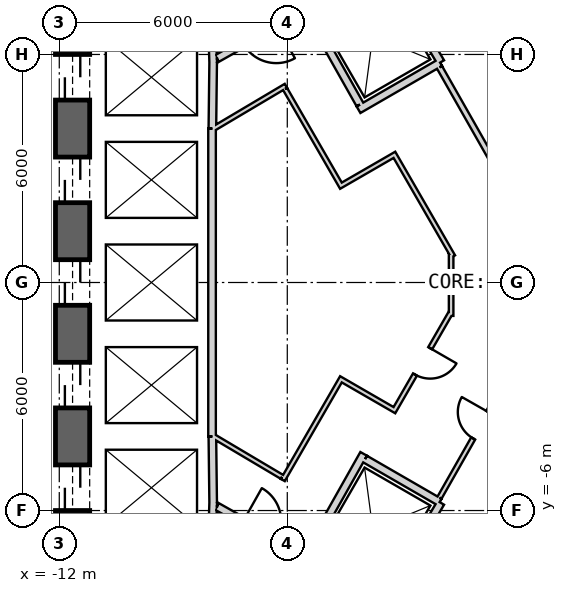
"""IFC4 building model, lengths in metres.
Left out: names, types, materials, properties, quantities, classifications, styles, units other than length and angle.
Written with IfcOpenShell. Run it as: python <this file> out.ifc"""

import sys

from ifc_helpers import new_model, si_unit, direction, frame, frame_2d, origin, place, context, subcontext, project, spatial, rectangle, extrude, element, fill, save


model = new_model("IFC4")
c1 = context("Model", 3, precision=1e-05, world=origin(), true_north=direction((0.0, 1.0)))
c2 = subcontext(c1, "Body", "Model", "MODEL_VIEW")
j1 = project(units=[si_unit("LENGTHUNIT", "METRE"), si_unit("PLANEANGLEUNIT", "RADIAN")], contexts=[c1])
p1 = place(None, origin())
s1 = spatial("IfcSite", under=j1, at=p1, CompositionType="ELEMENT")
p2 = place(p1, origin())
s2 = spatial("IfcBuilding", under=s1, at=p2, CompositionType="ELEMENT")
p3 = place(p2, frame((0.0, 0.0, 169.2)))
s3 = spatial("IfcBuildingStorey", under=s2, at=p3, CompositionType="ELEMENT", Elevation=169.2)
p4 = place(p3, frame((19.475, 2.208, 0.0), z_axis=(0.0, 0.0, 1.0), x_axis=(-0.866028369851, 0.499994862586, 0.0)))
e1 = element("IfcWall", 1, at=p4, inside=s3, PredefinedType="SHEAR", context=c2, shape_type="SweptSolid", body=[
    extrude(rectangle(XDim=31.523, YDim=0.9, at=frame_2d((15.762, 0.0))), origin(), (0.0, 0.0, 1.0), 4.0),
])
p5 = place(p4, frame((7.062, 0.0, 0.0)))
e2 = element("IfcOpeningElement", 2, at=p5, cuts=e1, PredefinedType="OPENING", context=c2, shape_type="SweptSolid", body=[
    extrude(rectangle(XDim=1.2, YDim=2.4, at=frame_2d((0.6, 1.2))), frame((0.0, 0.46, 0.0), z_axis=(0.0, -1.0, 0.0), x_axis=(1.0, 0.0, 0.0)), (0.0, 0.0, 1.0), 0.92),
])
p6 = place(p4, frame((3.612, 0.0, 0.0)))
e3 = element("IfcOpeningElement", 3, at=p6, cuts=e1, PredefinedType="OPENING", context=c2, shape_type="SweptSolid", body=[
    extrude(rectangle(XDim=1.2, YDim=2.4, at=frame_2d((0.6, 1.2))), frame((0.0, 0.46, 0.0), z_axis=(0.0, -1.0, 0.0), x_axis=(1.0, 0.0, 0.0)), (0.0, 0.0, 1.0), 0.92),
])
p7 = place(p4, frame((26.712, 0.0, 0.0)))
e4 = element("IfcOpeningElement", 4, at=p7, cuts=e1, PredefinedType="OPENING", context=c2, shape_type="SweptSolid", body=[
    extrude(rectangle(XDim=1.2, YDim=2.4, at=frame_2d((0.6, 1.2))), frame((0.0, 0.46, 0.0), z_axis=(0.0, -1.0, 0.0), x_axis=(1.0, 0.0, 0.0)), (0.0, 0.0, 1.0), 0.92),
])
p8 = place(p3, frame((-11.65, 15.762, 0.0), z_axis=(0.0, 0.0, 1.0), x_axis=(0.0, -1.0, 0.0)))
e5 = element("IfcWall", 5, at=p8, inside=s3, PredefinedType="SHEAR", context=c2, shape_type="SweptSolid", body=[
    extrude(rectangle(XDim=31.523, YDim=0.9, at=frame_2d((15.762, 0.0))), origin(), (0.0, 0.0, 1.0), 4.0),
])
p9 = place(p8, frame((7.062, 0.0, 0.0)))
e6 = element("IfcOpeningElement", 6, at=p9, cuts=e5, PredefinedType="OPENING", context=c2, shape_type="SweptSolid", body=[
    extrude(rectangle(XDim=1.2, YDim=2.4, at=frame_2d((0.6, 1.2))), frame((0.0, 0.46, 0.0), z_axis=(0.0, -1.0, 0.0), x_axis=(1.0, 0.0, 0.0)), (0.0, 0.0, 1.0), 0.92),
])
p10 = place(p8, frame((9.762, 0.0, 0.0)))
e7 = element("IfcOpeningElement", 7, at=p10, cuts=e5, PredefinedType="OPENING", context=c2, shape_type="SweptSolid", body=[
    extrude(rectangle(XDim=1.2, YDim=2.4, at=frame_2d((0.6, 1.2))), frame((0.0, 0.46, 0.0), z_axis=(0.0, -1.0, 0.0), x_axis=(1.0, 0.0, 0.0)), (0.0, 0.0, 1.0), 0.92),
])
p11 = place(p8, frame((12.462, 0.0, 0.0)))
e8 = element("IfcOpeningElement", 8, at=p11, cuts=e5, PredefinedType="OPENING", context=c2, shape_type="SweptSolid", body=[
    extrude(rectangle(XDim=1.2, YDim=2.4, at=frame_2d((0.6, 1.2))), frame((0.0, 0.46, 0.0), z_axis=(0.0, -1.0, 0.0), x_axis=(1.0, 0.0, 0.0)), (0.0, 0.0, 1.0), 0.92),
])
p12 = place(p8, frame((15.162, 0.0, 0.0)))
e9 = element("IfcOpeningElement", 9, at=p12, cuts=e5, PredefinedType="OPENING", context=c2, shape_type="SweptSolid", body=[
    extrude(rectangle(XDim=1.2, YDim=2.4, at=frame_2d((0.6, 1.2))), frame((0.0, 0.46, 0.0), z_axis=(0.0, -1.0, 0.0), x_axis=(1.0, 0.0, 0.0)), (0.0, 0.0, 1.0), 0.92),
])
p13 = place(p8, frame((17.862, 0.0, 0.0)))
e10 = element("IfcOpeningElement", 10, at=p13, cuts=e5, PredefinedType="OPENING", context=c2, shape_type="SweptSolid", body=[
    extrude(rectangle(XDim=1.2, YDim=2.4, at=frame_2d((0.6, 1.2))), frame((0.0, 0.46, 0.0), z_axis=(0.0, -1.0, 0.0), x_axis=(1.0, 0.0, 0.0)), (0.0, 0.0, 1.0), 0.92),
])
p14 = place(p8, frame((20.562, 0.0, 0.0)))
e11 = element("IfcOpeningElement", 11, at=p14, cuts=e5, PredefinedType="OPENING", context=c2, shape_type="SweptSolid", body=[
    extrude(rectangle(XDim=1.2, YDim=2.4, at=frame_2d((0.6, 1.2))), frame((0.0, 0.46, 0.0), z_axis=(0.0, -1.0, 0.0), x_axis=(1.0, 0.0, 0.0)), (0.0, 0.0, 1.0), 0.92),
])
p15 = place(p8, frame((23.262, 0.0, 0.0)))
e12 = element("IfcOpeningElement", 12, at=p15, cuts=e5, PredefinedType="OPENING", context=c2, shape_type="SweptSolid", body=[
    extrude(rectangle(XDim=1.2, YDim=2.4, at=frame_2d((0.6, 1.2))), frame((0.0, 0.46, 0.0), z_axis=(0.0, -1.0, 0.0), x_axis=(1.0, 0.0, 0.0)), (0.0, 0.0, 1.0), 0.92),
])
p16 = place(p8, frame((3.612, 0.0, 0.0)))
e13 = element("IfcOpeningElement", 13, at=p16, cuts=e5, PredefinedType="OPENING", context=c2, shape_type="SweptSolid", body=[
    extrude(rectangle(XDim=1.2, YDim=2.4, at=frame_2d((0.6, 1.2))), frame((0.0, 0.46, 0.0), z_axis=(0.0, -1.0, 0.0), x_axis=(1.0, 0.0, 0.0)), (0.0, 0.0, 1.0), 0.92),
])
p17 = place(p8, frame((26.712, 0.0, 0.0)))
e14 = element("IfcOpeningElement", 14, at=p17, cuts=e5, PredefinedType="OPENING", context=c2, shape_type="SweptSolid", body=[
    extrude(rectangle(XDim=1.2, YDim=2.4, at=frame_2d((0.6, 1.2))), frame((0.0, 0.46, 0.0), z_axis=(0.0, -1.0, 0.0), x_axis=(1.0, 0.0, 0.0)), (0.0, 0.0, 1.0), 0.92),
])
p18 = place(p3, frame((-7.825, -17.97, 0.0), z_axis=(0.0, 0.0, 1.0), x_axis=(0.866028369851, 0.499994862586, 0.0)))
e15 = element("IfcWall", 15, at=p18, inside=s3, PredefinedType="SHEAR", context=c2, shape_type="SweptSolid", body=[
    extrude(rectangle(XDim=31.523, YDim=0.9, at=frame_2d((15.762, 0.0))), origin(), (0.0, 0.0, 1.0), 4.0),
])
p19 = place(p18, frame((7.062, 0.0, 0.0)))
e16 = element("IfcOpeningElement", 16, at=p19, cuts=e15, PredefinedType="OPENING", context=c2, shape_type="SweptSolid", body=[
    extrude(rectangle(XDim=1.2, YDim=2.4, at=frame_2d((0.6, 1.2))), frame((0.0, 0.46, 0.0), z_axis=(0.0, -1.0, 0.0), x_axis=(1.0, 0.0, 0.0)), (0.0, 0.0, 1.0), 0.92),
])
p20 = place(p18, frame((9.762, 0.0, 0.0)))
e17 = element("IfcOpeningElement", 17, at=p20, cuts=e15, PredefinedType="OPENING", context=c2, shape_type="SweptSolid", body=[
    extrude(rectangle(XDim=1.2, YDim=2.4, at=frame_2d((0.6, 1.2))), frame((0.0, 0.46, 0.0), z_axis=(0.0, -1.0, 0.0), x_axis=(1.0, 0.0, 0.0)), (0.0, 0.0, 1.0), 0.92),
])
p21 = place(p18, frame((12.462, 0.0, 0.0)))
e18 = element("IfcOpeningElement", 18, at=p21, cuts=e15, PredefinedType="OPENING", context=c2, shape_type="SweptSolid", body=[
    extrude(rectangle(XDim=1.2, YDim=2.4, at=frame_2d((0.6, 1.2))), frame((0.0, 0.46, 0.0), z_axis=(0.0, -1.0, 0.0), x_axis=(1.0, 0.0, 0.0)), (0.0, 0.0, 1.0), 0.92),
])
p22 = place(p18, frame((15.162, 0.0, 0.0)))
e19 = element("IfcOpeningElement", 19, at=p22, cuts=e15, PredefinedType="OPENING", context=c2, shape_type="SweptSolid", body=[
    extrude(rectangle(XDim=1.2, YDim=2.4, at=frame_2d((0.6, 1.2))), frame((0.0, 0.46, 0.0), z_axis=(0.0, -1.0, 0.0), x_axis=(1.0, 0.0, 0.0)), (0.0, 0.0, 1.0), 0.92),
])
p23 = place(p18, frame((17.862, 0.0, 0.0)))
e20 = element("IfcOpeningElement", 20, at=p23, cuts=e15, PredefinedType="OPENING", context=c2, shape_type="SweptSolid", body=[
    extrude(rectangle(XDim=1.2, YDim=2.4, at=frame_2d((0.6, 1.2))), frame((0.0, 0.46, 0.0), z_axis=(0.0, -1.0, 0.0), x_axis=(1.0, 0.0, 0.0)), (0.0, 0.0, 1.0), 0.92),
])
p24 = place(p18, frame((20.562, 0.0, 0.0)))
e21 = element("IfcOpeningElement", 21, at=p24, cuts=e15, PredefinedType="OPENING", context=c2, shape_type="SweptSolid", body=[
    extrude(rectangle(XDim=1.2, YDim=2.4, at=frame_2d((0.6, 1.2))), frame((0.0, 0.46, 0.0), z_axis=(0.0, -1.0, 0.0), x_axis=(1.0, 0.0, 0.0)), (0.0, 0.0, 1.0), 0.92),
])
p25 = place(p18, frame((26.712, 0.0, 0.0)))
e22 = element("IfcOpeningElement", 22, at=p25, cuts=e15, PredefinedType="OPENING", context=c2, shape_type="SweptSolid", body=[
    extrude(rectangle(XDim=1.2, YDim=2.4, at=frame_2d((0.6, 1.2))), frame((0.0, 0.46, 0.0), z_axis=(0.0, -1.0, 0.0), x_axis=(1.0, 0.0, 0.0)), (0.0, 0.0, 1.0), 0.92),
])
p26 = place(p18, frame((3.612, 0.0, 0.0)))
e23 = element("IfcOpeningElement", 23, at=p26, cuts=e15, PredefinedType="OPENING", context=c2, shape_type="SweptSolid", body=[
    extrude(rectangle(XDim=1.2, YDim=2.4, at=frame_2d((0.6, 1.2))), frame((0.0, 0.46, 0.0), z_axis=(0.0, -1.0, 0.0), x_axis=(1.0, 0.0, 0.0)), (0.0, 0.0, 1.0), 0.92),
])
p27 = place(p3, frame((-7.977, 6.65, 0.0), z_axis=(0.0, 0.0, 1.0), x_axis=(0.030861509705, -0.999523670164, 0.0)))
e24 = element("IfcWall", 24, at=p27, inside=s3, PredefinedType="PLUMBINGWALL", context=c2, shape_type="SweptSolid", body=[
    extrude(rectangle(XDim=0.878, YDim=0.2, at=frame_2d((0.439, 0.0))), origin(), (0.0, 0.0, 1.0), 3.7),
])
p28 = place(p3, frame((-7.949, 5.895, 0.0), z_axis=(0.0, 0.0, 1.0), x_axis=(-0.012042535896, -0.999927486035, 0.0)))
e25 = element("IfcWall", 25, at=p28, inside=s3, PredefinedType="PLUMBINGWALL", context=c2, shape_type="SweptSolid", body=[
    extrude(rectangle(XDim=1.845, YDim=0.2, at=frame_2d((0.922, 0.0))), origin(), (0.0, 0.0, 1.0), 3.7),
])
p29 = place(p3, frame((-7.98, 4.05, 0.0), z_axis=(0.0, 0.0, 1.0), x_axis=(0.0, -1.0, 0.0)))
e26 = element("IfcWall", 26, at=p29, inside=s3, PredefinedType="PLUMBINGWALL", context=c2, shape_type="SweptSolid", body=[
    extrude(rectangle(XDim=8.1, YDim=0.2, at=frame_2d((4.05, 0.0))), origin(), (0.0, 0.0, 1.0), 3.7),
])
p30 = place(p3, frame((-7.95, -5.772, 0.0), z_axis=(0.0, 0.0, 1.0), x_axis=(-0.030803413295, -0.999525462272, 0.0)))
e27 = element("IfcWall", 27, at=p30, inside=s3, PredefinedType="PLUMBINGWALL", context=c2, shape_type="SweptSolid", body=[
    extrude(rectangle(XDim=1.078, YDim=0.2, at=frame_2d((0.539, 0.0))), origin(), (0.0, 0.0, 1.0), 3.7),
])
p31 = place(p3, frame((-7.971, -4.05, 0.0), z_axis=(0.0, 0.0, 1.0), x_axis=(0.012042535896, -0.999927486035, 0.0)))
e28 = element("IfcWall", 28, at=p31, inside=s3, PredefinedType="PLUMBINGWALL", context=c2, shape_type="SweptSolid", body=[
    extrude(rectangle(XDim=1.845, YDim=0.2, at=frame_2d((0.922, 0.0))), origin(), (0.0, 0.0, 1.0), 3.7),
])
p32 = place(p3, frame((-3.538, 8.465, 0.0), z_axis=(0.0, 0.0, 1.0), x_axis=(0.508647062354, -0.860975125052, 0.0)))
e29 = element("IfcWall", 29, at=p32, inside=s3, PredefinedType="PLUMBINGWALL", context=c2, shape_type="SweptSolid", body=[
    extrude(rectangle(XDim=3.1, YDim=0.2, at=frame_2d((1.55, 0.0))), origin(), (0.0, 0.0, 1.0), 3.7),
])
p33 = place(p3, frame((-1.979, 5.786, 0.0), z_axis=(0.0, 0.0, 1.0), x_axis=(-0.866016689309, -0.500015093611, 0.0)))
e30 = element("IfcWall", 30, at=p33, inside=s3, PredefinedType="PLUMBINGWALL", context=c2, shape_type="SweptSolid", body=[
    extrude(rectangle(XDim=2.479, YDim=0.2, at=frame_2d((1.24, 0.0))), origin(), (0.0, 0.0, 1.0), 3.7),
])
p34 = place(p3, frame((-5.562, 7.296, 0.0), z_axis=(0.0, 0.0, 1.0), x_axis=(0.49134651263, -0.870964180966, 0.0)))
e31 = element("IfcWall", 31, at=p34, inside=s3, PredefinedType="PLUMBINGWALL", context=c2, shape_type="SweptSolid", body=[
    extrude(rectangle(XDim=3.0, YDim=0.2, at=frame_2d((1.5, 0.0))), origin(), (0.0, 0.0, 1.0), 3.7),
])
p35 = place(p3, frame((-1.961, -5.796, 0.0), z_axis=(0.0, 0.0, 1.0), x_axis=(-0.508647062354, -0.860975125052, 0.0)))
e32 = element("IfcWall", 32, at=p35, inside=s3, PredefinedType="PLUMBINGWALL", context=c2, shape_type="SweptSolid", body=[
    extrude(rectangle(XDim=3.1, YDim=0.2, at=frame_2d((1.55, 0.0))), origin(), (0.0, 0.0, 1.0), 3.7),
])
p36 = place(p3, frame((-3.99, -4.509, 0.0), z_axis=(0.0, 0.0, 1.0), x_axis=(-0.491358283181, -0.870957540612, 0.0)))
e33 = element("IfcWall", 33, at=p36, inside=s3, PredefinedType="PLUMBINGWALL", context=c2, shape_type="SweptSolid", body=[
    extrude(rectangle(XDim=3.2, YDim=0.2, at=frame_2d((1.6, 0.0))), origin(), (0.0, 0.0, 1.0), 3.7),
])
p37 = place(p3, frame((-3.953, -4.646, 0.0), z_axis=(0.0, 0.0, 1.0), x_axis=(0.866065302921, -0.4999308863, 0.0)))
e34 = element("IfcWall", 34, at=p37, inside=s3, PredefinedType="PLUMBINGWALL", context=c2, shape_type="SweptSolid", body=[
    extrude(rectangle(XDim=2.264, YDim=0.2, at=frame_2d((1.132, 0.0))), origin(), (0.0, 0.0, 1.0), 3.7),
])
p38 = place(p3, frame((-5.6, 7.16, 0.0), z_axis=(0.0, 0.0, 1.0), x_axis=(-0.871363259478, -0.490638431059, 0.0)))
e35 = element("IfcWall", 35, at=p38, inside=s3, PredefinedType="PARTITIONING", context=c2, shape_type="SweptSolid", body=[
    extrude(rectangle(XDim=2.581, YDim=0.2, at=frame_2d((1.291, 0.0))), origin(), (0.0, 0.0, 1.0), 3.7),
])
p39 = place(p38, frame((0.791, 0.0, 0.0)))
e36 = element("IfcOpeningElement", 36, at=p39, cuts=e35, PredefinedType="OPENING", context=c2, shape_type="SweptSolid", body=[
    extrude(rectangle(XDim=1.0, YDim=2.1, at=frame_2d((0.5, 1.05))), frame((0.0, 0.11, 0.0), z_axis=(0.0, -1.0, 0.0), x_axis=(1.0, 0.0, 0.0)), (0.0, 0.0, 1.0), 0.22),
])
p40 = place(p3, frame((-7.849, -5.894, 0.0), z_axis=(0.0, 0.0, 1.0), x_axis=(0.871363259478, -0.490638431059, 0.0)))
e37 = element("IfcWall", 37, at=p40, inside=s3, PredefinedType="PARTITIONING", context=c2, shape_type="SweptSolid", body=[
    extrude(rectangle(XDim=2.581, YDim=0.2, at=frame_2d((1.291, 0.0))), origin(), (0.0, 0.0, 1.0), 3.7),
])
p41 = place(p40, frame((0.791, 0.0, 0.0)))
e38 = element("IfcOpeningElement", 38, at=p41, cuts=e37, PredefinedType="OPENING", context=c2, shape_type="SweptSolid", body=[
    extrude(rectangle(XDim=1.0, YDim=2.1, at=frame_2d((0.5, 1.05))), frame((0.0, 0.11, 0.0), z_axis=(0.0, -1.0, 0.0), x_axis=(1.0, 0.0, 0.0)), (0.0, 0.0, 1.0), 0.22),
])
p42 = place(p3, frame((-1.994, 5.661, 0.0), z_axis=(0.0, 0.0, 1.0), x_axis=(0.494341211302, -0.869267948798, 0.0)))
e39 = element("IfcWall", 39, at=p42, inside=s3, PredefinedType="PLUMBINGWALL", context=c2, shape_type="SweptSolid", body=[
    extrude(rectangle(XDim=4.361, YDim=0.15, at=frame_2d((2.18, 0.0))), origin(), (0.0, 0.0, 1.0), 3.7),
])
p43 = place(p3, frame((0.224, -1.761, 0.0), z_axis=(0.0, 0.0, 1.0), x_axis=(-0.494327216836, -0.869275907118, 0.0)))
e40 = element("IfcWall", 40, at=p43, inside=s3, PredefinedType="PARTITIONING", context=c2, shape_type="SweptSolid", body=[
    extrude(rectangle(XDim=4.487, YDim=0.12, at=frame_2d((2.244, 0.0))), origin(), (0.0, 0.0, 1.0), 3.7),
])
p44 = place(p43, frame((1.895, 0.0, 0.0)))
e41 = element("IfcOpeningElement", 41, at=p44, cuts=e40, PredefinedType="OPENING", context=c2, shape_type="SweptSolid", body=[
    extrude(rectangle(XDim=0.8, YDim=2.1, at=frame_2d((0.4, 1.05))), frame((0.0, 0.07, 0.0), z_axis=(0.0, -1.0, 0.0), x_axis=(1.0, 0.0, 0.0)), (0.0, 0.0, 1.0), 0.14),
])
p45 = place(p3, frame((-6.037, 5.176, 0.0), z_axis=(0.0, 0.0, 1.0), x_axis=(-0.860106072674, -0.510115225953, 0.0)))
e42 = element("IfcWall", 42, at=p45, inside=s3, PredefinedType="PARTITIONING", context=c2, shape_type="SweptSolid", body=[
    extrude(rectangle(XDim=2.225, YDim=0.12, at=frame_2d((1.112, 0.0))), origin(), (0.0, 0.0, 1.0), 3.7),
])
p46 = place(p3, frame((-4.558, 2.495, 0.0), z_axis=(0.0, 0.0, 1.0), x_axis=(-0.499990139034, 0.866031096941, 0.0)))
e43 = element("IfcWall", 43, at=p46, inside=s3, PredefinedType="PARTITIONING", context=c2, shape_type="SweptSolid", body=[
    extrude(rectangle(XDim=3.0, YDim=0.12, at=frame_2d((1.5, 0.0))), origin(), (0.0, 0.0, 1.0), 3.7),
])
p47 = place(p3, frame((-3.129, 3.39, 0.0), z_axis=(0.0, 0.0, 1.0), x_axis=(-0.866053003207, -0.499952193351, 0.0)))
e44 = element("IfcWall", 44, at=p47, inside=s3, PredefinedType="PARTITIONING", context=c2, shape_type="SweptSolid", body=[
    extrude(rectangle(XDim=1.625, YDim=0.12, at=frame_2d((0.812, 0.0))), origin(), (0.0, 0.0, 1.0), 3.7),
])
p48 = place(p3, frame((-1.637, 0.685, 0.0), z_axis=(0.0, 0.0, 1.0), x_axis=(-0.500006252586, 0.866021793822, 0.0)))
e45 = element("IfcWall", 45, at=p48, inside=s3, PredefinedType="PARTITIONING", context=c2, shape_type="SweptSolid", body=[
    extrude(rectangle(XDim=3.028, YDim=0.12, at=frame_2d((1.514, 0.0))), origin(), (0.0, 0.0, 1.0), 3.7),
])
p49 = place(p3, frame((-1.689, -0.879, 0.0), z_axis=(0.0, 0.0, 1.0), x_axis=(0.0, 1.0, 0.0)))
e46 = element("IfcWall", 46, at=p49, inside=s3, PredefinedType="PARTITIONING", context=c2, shape_type="SweptSolid", body=[
    extrude(rectangle(XDim=1.635, YDim=0.12, at=frame_2d((0.818, 0.0))), origin(), (0.0, 0.0, 1.0), 3.7),
])
p50 = place(p3, frame((-3.211, -3.412, 0.0), z_axis=(0.0, 0.0, 1.0), x_axis=(0.499983190554, 0.866035108505, 0.0)))
e47 = element("IfcWall", 47, at=p50, inside=s3, PredefinedType="PARTITIONING", context=c2, shape_type="SweptSolid", body=[
    extrude(rectangle(XDim=3.026, YDim=0.12, at=frame_2d((1.513, 0.0))), origin(), (0.0, 0.0, 1.0), 3.7),
])
p51 = place(p50, frame((1.143, 0.0, 0.0)))
e48 = element("IfcOpeningElement", 48, at=p51, cuts=e47, PredefinedType="OPENING", context=c2, shape_type="SweptSolid", body=[
    extrude(rectangle(XDim=0.8, YDim=2.1, at=frame_2d((0.4, 1.05))), frame((0.0, 0.07, 0.0), z_axis=(0.0, -1.0, 0.0), x_axis=(1.0, 0.0, 0.0)), (0.0, 0.0, 1.0), 0.14),
])
p52 = place(p3, frame((-4.64, -2.517, 0.0), z_axis=(0.0, 0.0, 1.0), x_axis=(0.866015446554, -0.500017246033, 0.0)))
e49 = element("IfcWall", 49, at=p52, inside=s3, PredefinedType="PARTITIONING", context=c2, shape_type="SweptSolid", body=[
    extrude(rectangle(XDim=1.625, YDim=0.12, at=frame_2d((0.812, 0.0))), origin(), (0.0, 0.0, 1.0), 3.7),
])
p53 = place(p3, frame((-6.118, -5.197, 0.0), z_axis=(0.0, 0.0, 1.0), x_axis=(0.499990139034, 0.866031096941, 0.0)))
e50 = element("IfcWall", 50, at=p53, inside=s3, PredefinedType="PARTITIONING", context=c2, shape_type="SweptSolid", body=[
    extrude(rectangle(XDim=3.0, YDim=0.12, at=frame_2d((1.5, 0.0))), origin(), (0.0, 0.0, 1.0), 3.7),
])
p54 = place(p3, frame((-7.95, -4.041, 0.0), z_axis=(0.0, 0.0, 1.0), x_axis=(0.860112457103, -0.510104461004, 0.0)))
e51 = element("IfcWall", 51, at=p54, inside=s3, PredefinedType="PARTITIONING", context=c2, shape_type="SweptSolid", body=[
    extrude(rectangle(XDim=2.104, YDim=0.12, at=frame_2d((1.052, 0.0))), origin(), (0.0, 0.0, 1.0), 3.7),
])
p55 = place(p44, origin())
e52 = element("IfcDoor", 52, at=p55, inside=s3, OperationType="SINGLE_SWING_LEFT", PredefinedType="USERDEFINED", context=c2, shape_type="SweptSolid", body=[
    extrude(rectangle(XDim=0.8, YDim=2.1, at=frame_2d((0.4, 1.05))), frame((0.0, 0.025, 0.0), z_axis=(0.0, -1.0, 0.0), x_axis=(1.0, 0.0, 0.0)), (0.0, 0.0, 1.0), 0.05),
])
fill(e41, e52)
p56 = place(p51, origin())
e53 = element("IfcDoor", 53, at=p56, inside=s3, OperationType="SINGLE_SWING_LEFT", PredefinedType="USERDEFINED", context=c2, shape_type="SweptSolid", body=[
    extrude(rectangle(XDim=0.8, YDim=2.1, at=frame_2d((0.4, 1.05))), frame((0.0, 0.025, 0.0), z_axis=(0.0, -1.0, 0.0), x_axis=(1.0, 0.0, 0.0)), (0.0, 0.0, 1.0), 0.05),
])
fill(e48, e53)
p57 = place(p10, origin())
e54 = element("IfcDoor", 54, at=p57, inside=s3, OperationType="SLIDING_TO_LEFT", PredefinedType="USERDEFINED", context=c2, shape_type="SweptSolid", body=[
    extrude(rectangle(XDim=1.2, YDim=2.4, at=frame_2d((0.6, 1.2))), frame((0.0, 0.025, 0.0), z_axis=(0.0, -1.0, 0.0), x_axis=(1.0, 0.0, 0.0)), (0.0, 0.0, 1.0), 0.05),
])
fill(e7, e54)
p58 = place(p11, origin())
e55 = element("IfcDoor", 55, at=p58, inside=s3, OperationType="SLIDING_TO_LEFT", PredefinedType="USERDEFINED", context=c2, shape_type="SweptSolid", body=[
    extrude(rectangle(XDim=1.2, YDim=2.4, at=frame_2d((0.6, 1.2))), frame((0.0, 0.025, 0.0), z_axis=(0.0, -1.0, 0.0), x_axis=(1.0, 0.0, 0.0)), (0.0, 0.0, 1.0), 0.05),
])
fill(e8, e55)
p59 = place(p12, origin())
e56 = element("IfcDoor", 56, at=p59, inside=s3, OperationType="SLIDING_TO_LEFT", PredefinedType="USERDEFINED", context=c2, shape_type="SweptSolid", body=[
    extrude(rectangle(XDim=1.2, YDim=2.4, at=frame_2d((0.6, 1.2))), frame((0.0, 0.025, 0.0), z_axis=(0.0, -1.0, 0.0), x_axis=(1.0, 0.0, 0.0)), (0.0, 0.0, 1.0), 0.05),
])
fill(e9, e56)
p60 = place(p13, origin())
e57 = element("IfcDoor", 57, at=p60, inside=s3, OperationType="SLIDING_TO_LEFT", PredefinedType="USERDEFINED", context=c2, shape_type="SweptSolid", body=[
    extrude(rectangle(XDim=1.2, YDim=2.4, at=frame_2d((0.6, 1.2))), frame((0.0, 0.025, 0.0), z_axis=(0.0, -1.0, 0.0), x_axis=(1.0, 0.0, 0.0)), (0.0, 0.0, 1.0), 0.05),
])
fill(e10, e57)
p61 = place(p14, origin())
e58 = element("IfcDoor", 58, at=p61, inside=s3, OperationType="SLIDING_TO_LEFT", PredefinedType="USERDEFINED", context=c2, shape_type="SweptSolid", body=[
    extrude(rectangle(XDim=1.2, YDim=2.4, at=frame_2d((0.6, 1.2))), frame((0.0, 0.025, 0.0), z_axis=(0.0, -1.0, 0.0), x_axis=(1.0, 0.0, 0.0)), (0.0, 0.0, 1.0), 0.05),
])
fill(e11, e58)
save(model, sys.argv[1])
